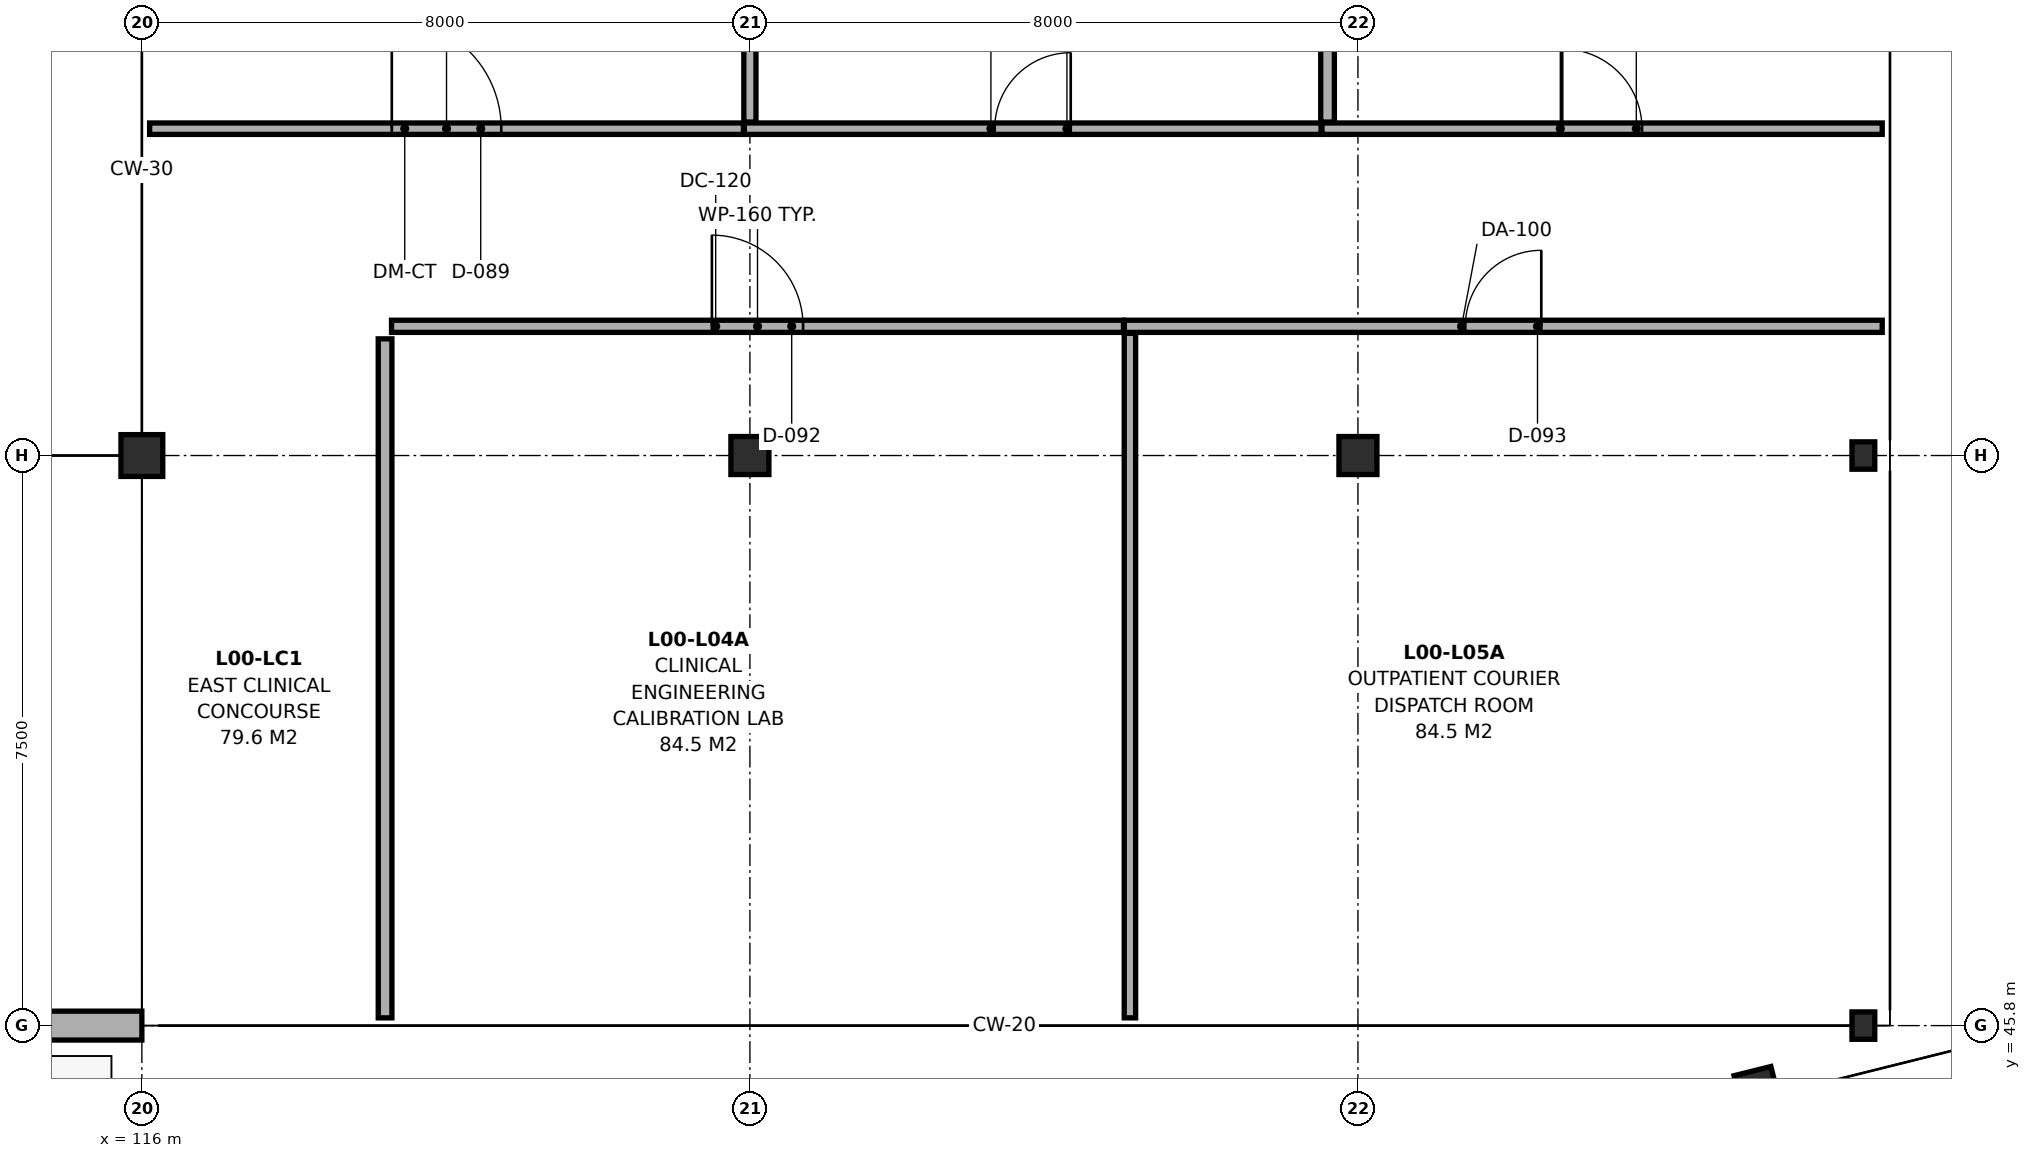
"""IFC4 building model, lengths in metres.
Left out: names, types, materials, properties, quantities, classifications, styles, units other than length and angle.
Written with IfcOpenShell. Run it as: python <this file> out.ifc"""

import sys

from ifc_helpers import new_model, si_unit, direction, frame, frame_2d, origin, origin_2d, place, context, subcontext, project, spatial, rectangle, i_section, extrude, element, fill, save


model = new_model("IFC4")
c1 = context("Model", 3, precision=1e-05, world=origin(), true_north=direction((0.0, 1.0)))
c2 = subcontext(c1, "Body", "Model", "MODEL_VIEW")
j1 = project(units=[si_unit("LENGTHUNIT", "METRE"), si_unit("PLANEANGLEUNIT", "RADIAN")], contexts=[c1])
p1 = place(None, origin())
s1 = spatial("IfcSite", under=j1, at=p1, CompositionType="ELEMENT")
p2 = place(p1, origin())
s2 = spatial("IfcBuilding", under=s1, at=p2, CompositionType="ELEMENT")
p3 = place(p2, origin())
s3 = spatial("IfcBuildingStorey", under=s2, at=p3, CompositionType="ELEMENT", Elevation=0.0)
p4 = place(p3, frame((116.0, 53.3, 0.0), z_axis=(0.0, 0.0, 1.0), x_axis=(1.0, 0.0, 0.0)))
e1 = element("IfcColumn", 1, at=p4, inside=s3, PredefinedType="COLUMN", context=c2, shape_type="SweptSolid", body=[
    extrude(rectangle(XDim=0.55, YDim=0.55, at=origin_2d()), origin(), (0.0, 0.0, 1.0), 4.7),
])
for number, where, z_axis, x_axis in (
    (2, (124.0, 53.3, 0.0), (0.0, 0.0, 1.0), (1.0, 0.0, 0.0)),
    (3, (132.0, 53.3, 0.0), (0.0, 0.0, 1.0), (1.0, 0.0, 0.0)),
):
    element("IfcColumn", number, at=place(p3, frame(where, z_axis=z_axis, x_axis=x_axis)), inside=s3, PredefinedType="COLUMN", context=c2, shape_type="SweptSolid", body=[
        extrude(rectangle(XDim=0.5, YDim=0.5, at=origin_2d()), origin(), (0.0, 0.0, 1.0), 4.704),
    ])
p5 = place(p3, frame((137.281, 44.837, 0.0), z_axis=(0.0, 0.0, 1.0), x_axis=(0.970295726276, 0.2419218956, 0.0)))
e4 = element("IfcColumn", 4, at=p5, inside=s3, PredefinedType="COLUMN", context=c2, shape_type="SweptSolid", body=[
    extrude(rectangle(XDim=0.5, YDim=0.75, at=origin_2d()), origin(), (0.0, 0.0, 1.0), 4.7),
])
p6 = place(p3, frame((138.65, 45.8, 0.0), z_axis=(0.0, 0.0, 1.0), x_axis=(1.0, 0.0, 0.0)))
e5 = element("IfcColumn", 5, at=p6, inside=s3, PredefinedType="COLUMN", context=c2, shape_type="SweptSolid", body=[
    extrude(i_section(OverallWidth=0.3, OverallDepth=0.36, WebThickness=0.012, FlangeThickness=0.022, FilletRadius=0.027, at=origin_2d()), origin(), (0.0, 0.0, 1.0), 4.735),
])
p7 = place(p3, frame((138.65, 53.3, 0.0), z_axis=(0.0, 0.0, 1.0), x_axis=(1.0, 0.0, 0.0)))
e6 = element("IfcColumn", 6, at=p7, inside=s3, PredefinedType="COLUMN", context=c2, shape_type="SweptSolid", body=[
    extrude(i_section(OverallWidth=0.3, OverallDepth=0.36, WebThickness=0.012, FlangeThickness=0.022, FilletRadius=0.027, at=origin_2d()), origin(), (0.0, 0.0, 1.0), 4.733),
])
p8 = place(p3, frame((116.0, 45.8, 0.0), z_axis=(0.0, 0.0, 1.0), x_axis=(-1.0, 0.0, 0.0)))
e7 = element("IfcWall", 7, at=p8, inside=s3, PredefinedType="SOLIDWALL", context=c2, shape_type="SweptSolid", body=[
    extrude(rectangle(XDim=7.625, YDim=0.38, at=frame_2d((3.812, 0.0))), origin(), (0.0, 0.0, 1.0), 4.67),
])
p9 = place(p8, frame((2.663, 0.0, 0.0)))
e8 = element("IfcOpeningElement", 8, at=p9, cuts=e7, PredefinedType="OPENING", context=c2, shape_type="SweptSolid", body=[
    extrude(rectangle(XDim=2.3, YDim=2.5, at=frame_2d((1.15, 1.25))), frame((0.0, 0.202, 0.0), z_axis=(0.0, -1.0, 0.0), x_axis=(1.0, 0.0, 0.0)), (0.0, 0.0, 1.0), 0.404),
])
p10 = place(p3, frame((116.102, 57.6, 0.0), z_axis=(0.0, 0.0, 1.0), x_axis=(1.0, 0.0, 0.0)))
e9 = element("IfcWall", 9, at=p10, inside=s3, PredefinedType="PARTITIONING", context=c2, shape_type="SweptSolid", body=[
    extrude(rectangle(XDim=7.813, YDim=0.15, at=frame_2d((3.906, 0.0))), origin(), (0.0, 0.0, 1.0), 4.67),
])
p11 = place(p10, frame((3.187, 0.0, 0.0)))
e10 = element("IfcOpeningElement", 10, at=p11, cuts=e9, PredefinedType="OPENING", context=c2, shape_type="SweptSolid", body=[
    extrude(rectangle(XDim=1.44, YDim=2.32, at=frame_2d((0.72, 1.16))), frame((0.0, 0.087, 0.0), z_axis=(0.0, -1.0, 0.0), x_axis=(1.0, 0.0, 0.0)), (0.0, 0.0, 1.0), 0.174),
])
p12 = place(p3, frame((123.927, 57.6, 0.0), z_axis=(0.0, 0.0, 1.0), x_axis=(1.0, 0.0, 0.0)))
e11 = element("IfcWall", 11, at=p12, inside=s3, PredefinedType="PARTITIONING", context=c2, shape_type="SweptSolid", body=[
    extrude(rectangle(XDim=7.588, YDim=0.15, at=frame_2d((3.794, 0.0))), origin(), (0.0, 0.0, 1.0), 4.67),
])
p13 = place(p12, frame((3.294, 0.0, 0.0)))
e12 = element("IfcOpeningElement", 12, at=p13, cuts=e11, PredefinedType="OPENING", context=c2, shape_type="SweptSolid", body=[
    extrude(rectangle(XDim=1.0, YDim=2.15, at=frame_2d((0.5, 1.075))), frame((0.0, 0.087, 0.0), z_axis=(0.0, -1.0, 0.0), x_axis=(1.0, 0.0, 0.0)), (0.0, 0.0, 1.0), 0.174),
])
p14 = place(p3, frame((131.527, 57.6, 0.0), z_axis=(0.0, 0.0, 1.0), x_axis=(1.0, 0.0, 0.0)))
e13 = element("IfcWall", 13, at=p14, inside=s3, PredefinedType="PARTITIONING", context=c2, shape_type="SweptSolid", body=[
    extrude(rectangle(XDim=7.371, YDim=0.15, at=frame_2d((3.686, 0.0))), origin(), (0.0, 0.0, 1.0), 4.018),
])
p15 = place(p14, frame((3.16, 0.0, 0.0)))
e14 = element("IfcOpeningElement", 14, at=p15, cuts=e13, PredefinedType="OPENING", context=c2, shape_type="SweptSolid", body=[
    extrude(rectangle(XDim=1.05, YDim=2.15, at=frame_2d((0.525, 1.075))), frame((0.0, 0.087, 0.0), z_axis=(0.0, -1.0, 0.0), x_axis=(1.0, 0.0, 0.0)), (0.0, 0.0, 1.0), 0.174),
])
p16 = place(p3, frame((119.285, 55.0, 0.0), z_axis=(0.0, 0.0, 1.0), x_axis=(1.0, 0.0, 0.0)))
e15 = element("IfcWall", 15, at=p16, inside=s3, PredefinedType="PARTITIONING", context=c2, shape_type="SweptSolid", body=[
    extrude(rectangle(XDim=9.63, YDim=0.16, at=frame_2d((4.815, 0.0))), origin(), (0.0, 0.0, 1.0), 4.67),
])
p17 = place(p16, frame((4.215, 0.0, 0.0)))
e16 = element("IfcOpeningElement", 16, at=p17, cuts=e15, PredefinedType="OPENING", context=c2, shape_type="SweptSolid", body=[
    extrude(rectangle(XDim=1.2, YDim=2.15, at=frame_2d((0.6, 1.075))), frame((0.0, 0.092, 0.0), z_axis=(0.0, -1.0, 0.0), x_axis=(1.0, 0.0, 0.0)), (0.0, 0.0, 1.0), 0.184),
])
p18 = place(p3, frame((128.927, 55.0, 0.0), z_axis=(0.0, 0.0, 1.0), x_axis=(1.0, 0.0, 0.0)))
e17 = element("IfcWall", 17, at=p18, inside=s3, PredefinedType="PARTITIONING", context=c2, shape_type="SweptSolid", body=[
    extrude(rectangle(XDim=9.971, YDim=0.16, at=frame_2d((4.985, 0.0))), origin(), (0.0, 0.0, 1.0), 4.018),
])
p19 = place(p18, frame((4.486, 0.0, 0.0)))
e18 = element("IfcOpeningElement", 18, at=p19, cuts=e17, PredefinedType="OPENING", context=c2, shape_type="SweptSolid", body=[
    extrude(rectangle(XDim=1.0, YDim=2.22, at=frame_2d((0.5, 1.11))), frame((0.0, 0.092, 0.0), z_axis=(0.0, -1.0, 0.0), x_axis=(1.0, 0.0, 0.0)), (0.0, 0.0, 1.0), 0.184),
])
p20 = place(p3, frame((124.0, 57.687, 0.0), z_axis=(0.0, 0.0, 1.0), x_axis=(0.0, 1.0, 0.0)))
e19 = element("IfcWall", 19, at=p20, inside=s3, PredefinedType="PARTITIONING", context=c2, shape_type="SweptSolid", body=[
    extrude(rectangle(XDim=17.826, YDim=0.16, at=frame_2d((8.913, 0.0))), origin(), (0.0, 0.0, 1.0), 3.985),
])
p21 = place(p3, frame((131.6, 57.687, 0.0), z_axis=(0.0, 0.0, 1.0), x_axis=(0.0, 1.0, 0.0)))
e20 = element("IfcWall", 20, at=p21, inside=s3, PredefinedType="PARTITIONING", context=c2, shape_type="SweptSolid", body=[
    extrude(rectangle(XDim=17.826, YDim=0.18, at=frame_2d((8.913, 0.0))), origin(), (0.0, 0.0, 1.0), 3.985),
])
p22 = place(p3, frame((119.2, 45.902, 0.0), z_axis=(0.0, 0.0, 1.0), x_axis=(0.0, 1.0, 0.0)))
e21 = element("IfcWall", 21, at=p22, inside=s3, PredefinedType="PARTITIONING", context=c2, shape_type="SweptSolid", body=[
    extrude(rectangle(XDim=8.933, YDim=0.18, at=frame_2d((4.466, 0.0))), origin(), (0.0, 0.0, 1.0), 4.67),
])
p23 = place(p3, frame((129.0, 45.902, 0.0), z_axis=(0.0, 0.0, 1.0), x_axis=(0.0, 1.0, 0.0)))
e22 = element("IfcWall", 22, at=p23, inside=s3, PredefinedType="PARTITIONING", context=c2, shape_type="SweptSolid", body=[
    extrude(rectangle(XDim=9.006, YDim=0.15, at=frame_2d((4.503, 0.0))), origin(), (0.0, 0.0, 1.0), 4.67),
])
p24 = place(p11, origin())
e23 = element("IfcDoor", 23, at=p24, inside=s3, OperationType="SINGLE_SWING_LEFT", PredefinedType="DOOR", context=c2, shape_type="SweptSolid", body=[
    extrude(rectangle(XDim=1.44, YDim=2.32, at=frame_2d((0.72, 1.16))), frame((0.0, 0.025, 0.0), z_axis=(0.0, -1.0, 0.0), x_axis=(1.0, 0.0, 0.0)), (0.0, 0.0, 1.0), 0.05),
])
fill(e10, e23)
p25 = place(p13, origin())
e24 = element("IfcDoor", 24, at=p25, inside=s3, OperationType="SINGLE_SWING_RIGHT", PredefinedType="DOOR", context=c2, shape_type="SweptSolid", body=[
    extrude(rectangle(XDim=1.0, YDim=2.15, at=frame_2d((0.5, 1.075))), frame((0.0, 0.025, 0.0), z_axis=(0.0, -1.0, 0.0), x_axis=(1.0, 0.0, 0.0)), (0.0, 0.0, 1.0), 0.05),
])
fill(e12, e24)
p26 = place(p15, origin())
e25 = element("IfcDoor", 25, at=p26, inside=s3, OperationType="SINGLE_SWING_LEFT", PredefinedType="DOOR", context=c2, shape_type="SweptSolid", body=[
    extrude(rectangle(XDim=1.05, YDim=2.15, at=frame_2d((0.525, 1.075))), frame((0.0, 0.025, 0.0), z_axis=(0.0, -1.0, 0.0), x_axis=(1.0, 0.0, 0.0)), (0.0, 0.0, 1.0), 0.05),
])
fill(e14, e25)
p27 = place(p17, origin())
e26 = element("IfcDoor", 26, at=p27, inside=s3, OperationType="SINGLE_SWING_LEFT", PredefinedType="DOOR", context=c2, shape_type="SweptSolid", body=[
    extrude(rectangle(XDim=1.2, YDim=2.15, at=frame_2d((0.6, 1.075))), frame((0.0, 0.025, 0.0), z_axis=(0.0, -1.0, 0.0), x_axis=(1.0, 0.0, 0.0)), (0.0, 0.0, 1.0), 0.05),
])
fill(e16, e26)
p28 = place(p19, origin())
e27 = element("IfcDoor", 27, at=p28, inside=s3, OperationType="SINGLE_SWING_RIGHT", PredefinedType="DOOR", context=c2, shape_type="SweptSolid", body=[
    extrude(rectangle(XDim=1.0, YDim=2.22, at=frame_2d((0.5, 1.11))), frame((0.0, 0.025, 0.0), z_axis=(0.0, -1.0, 0.0), x_axis=(1.0, 0.0, 0.0)), (0.0, 0.0, 1.0), 0.05),
])
fill(e18, e27)
save(model, sys.argv[1])
